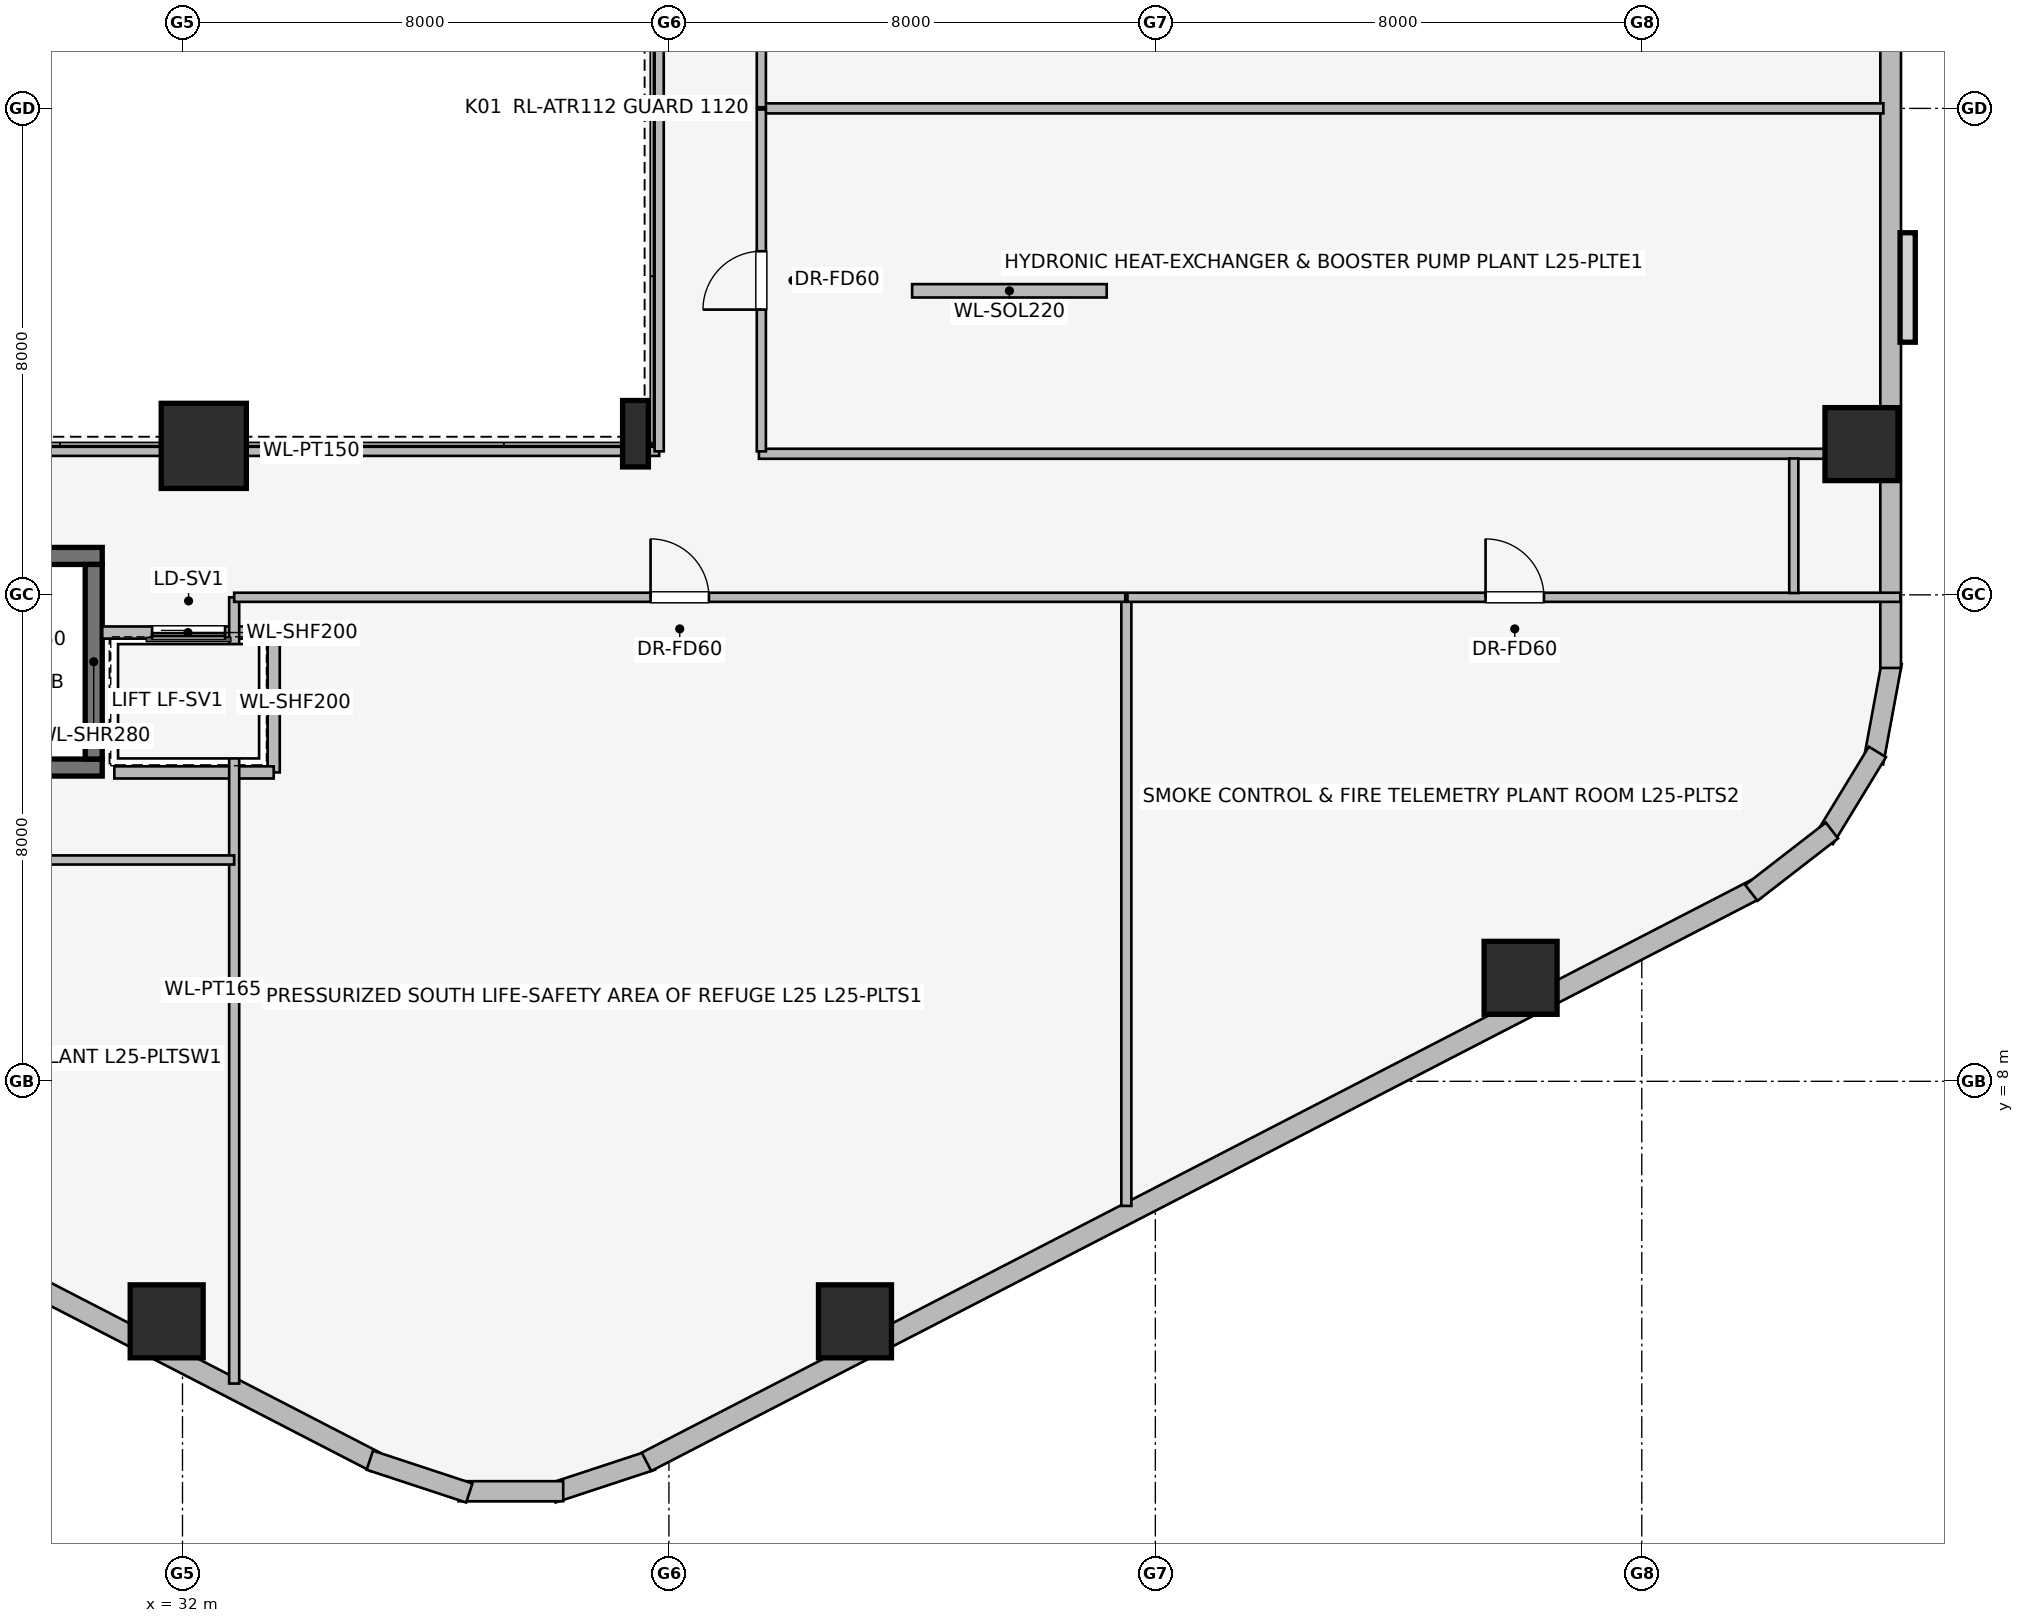
"""IFC4 building model, lengths in metres.
Left out: names, types, materials, properties, quantities, classifications, styles, units other than length and angle.
Written with IfcOpenShell. Run it as: python <this file> out.ifc"""

import sys

from ifc_helpers import new_model, si_unit, direction, frame, frame_2d, origin, origin_2d, place, context, subcontext, project, spatial, rectangle, i_section, extrude, element, fill, save


model = new_model("IFC4")
c1 = context("Model", 3, precision=1e-05, world=origin(), true_north=direction((0.0, 1.0)))
c2 = subcontext(c1, "Body", "Model", "MODEL_VIEW")
j1 = project(units=[si_unit("LENGTHUNIT", "METRE"), si_unit("PLANEANGLEUNIT", "RADIAN")], contexts=[c1])
p1 = place(None, origin())
s1 = spatial("IfcSite", under=j1, at=p1, CompositionType="ELEMENT")
p2 = place(p1, origin())
s2 = spatial("IfcBuilding", under=s1, at=p2, CompositionType="ELEMENT")
p3 = place(p2, frame((0.0, 0.0, 96.35)))
s3 = spatial("IfcBuildingStorey", under=s2, at=p3, CompositionType="ELEMENT", Elevation=96.35)
p4 = place(p3, frame((22.32, 13.16, 0.0), z_axis=(0.0, 0.0, 1.0), x_axis=(1.0, 0.0, 0.0)))
e1 = element("IfcWall", 1, at=p4, inside=s3, PredefinedType="SHEAR", context=c2, shape_type="SweptSolid", body=[
    extrude(rectangle(XDim=8.36, YDim=0.28, at=frame_2d((4.18, 0.0))), origin(), (0.0, 0.0, 1.0), 5.2),
])
p5 = place(p3, frame((30.68, 16.64, 0.0), z_axis=(0.0, 0.0, 1.0), x_axis=(-1.0, 0.0, 0.0)))
e2 = element("IfcWall", 2, at=p5, inside=s3, PredefinedType="SHEAR", context=c2, shape_type="SweptSolid", body=[
    extrude(rectangle(XDim=8.36, YDim=0.28, at=frame_2d((4.18, 0.0))), origin(), (0.0, 0.0, 1.0), 5.2),
])
p6 = place(p5, frame((6.08, 0.0, 0.0)))
e3 = element("IfcOpeningElement", 3, at=p6, cuts=e2, PredefinedType="OPENING", context=c2, shape_type="SweptSolid", body=[
    extrude(rectangle(XDim=1.05, YDim=2.0, at=frame_2d((0.525, 1.0))), frame((0.0, 0.15, 0.0), z_axis=(0.0, -1.0, 0.0), x_axis=(1.0, 0.0, 0.0)), (0.0, 0.0, 1.0), 0.3),
])
p7 = place(p3, frame((30.54, 13.3, 0.0), z_axis=(0.0, 0.0, 1.0), x_axis=(0.0, 1.0, 0.0)))
e4 = element("IfcWall", 4, at=p7, inside=s3, PredefinedType="SHEAR", context=c2, shape_type="SweptSolid", body=[
    extrude(rectangle(XDim=3.2, YDim=0.28, at=frame_2d((1.6, 0.0))), origin(), (0.0, 0.0, 1.0), 5.2),
])
p8 = place(p3, frame((32.35, 18.45, 0.0), z_axis=(0.0, 0.0, 1.0), x_axis=(1.0, 0.0, 0.0)))
e5 = element("IfcColumn", 5, at=p8, inside=s3, PredefinedType="COLUMN", context=c2, shape_type="SweptSolid", body=[
    extrude(rectangle(XDim=1.4, YDim=1.4, at=origin_2d()), origin(), (0.0, 0.0, 1.0), 5.2),
])
for number, where, z_axis, x_axis in (
    (6, (31.74, 4.053, 0.0), (0.0, 0.0, 1.0), (1.0, 0.0, 0.0)),
    (7, (43.06, 4.053, 0.0), (0.0, 0.0, 1.0), (1.0, 0.0, 0.0)),
    (8, (54.007, 9.702, 0.0), (0.0, 0.0, 1.0), (1.0, 0.0, 0.0)),
    (9, (59.613, 18.479, 0.0), (0.0, 0.0, 1.0), (1.0, 0.0, 0.0)),
):
    element("IfcColumn", number, at=place(p3, frame(where, z_axis=z_axis, x_axis=x_axis)), inside=s3, PredefinedType="COLUMN", context=c2, shape_type="SweptSolid", body=[
        extrude(rectangle(XDim=1.2, YDim=1.2, at=origin_2d()), origin(), (0.0, 0.0, 1.0), 5.2),
    ])
p9 = place(p3, frame((39.45, 18.65, 0.0), z_axis=(0.0, 0.0, 1.0), x_axis=(1.0, 0.0, 0.0)))
e10 = element("IfcColumn", 10, at=p9, inside=s3, PredefinedType="COLUMN", context=c2, shape_type="SweptSolid", body=[
    extrude(i_section(OverallWidth=0.424, OverallDepth=1.092, WebThickness=0.045, FlangeThickness=0.082, at=origin_2d()), origin(), (0.0, 0.0, 1.0), 5.2),
])
p10 = place(p3, frame((35.169, 1.743, 0.0), z_axis=(0.0, 0.0, 1.0), x_axis=(-0.888634413993, 0.458616264721, 0.0)))
e11 = element("IfcWall", 11, at=p10, inside=s3, PredefinedType="STANDARD", context=c2, shape_type="SweptSolid", body=[
    extrude(rectangle(XDim=20.531, YDim=0.34, at=frame_2d((10.266, 0.0))), origin(), (0.0, 0.0, 1.0), 3.688),
])
p11 = place(p3, frame((39.719, 1.769, 0.0), z_axis=(0.0, 0.0, 1.0), x_axis=(-0.94976901097, -0.312951794691, 0.0)))
e12 = element("IfcWall", 12, at=p11, inside=s3, PredefinedType="STANDARD", context=c2, shape_type="SweptSolid", body=[
    extrude(rectangle(XDim=1.722, YDim=0.33, at=frame_2d((0.861, 0.0))), origin(), (0.0, 0.0, 1.0), 4.78),
])
p12 = place(p3, frame((38.261, 1.259, 0.0), z_axis=(0.0, 0.0, 1.0), x_axis=(-1.0, 0.0, 0.0)))
e13 = element("IfcWall", 13, at=p12, inside=s3, PredefinedType="STANDARD", context=c2, shape_type="SweptSolid", body=[
    extrude(rectangle(XDim=1.722, YDim=0.33, at=frame_2d((0.861, 0.0))), origin(), (0.0, 0.0, 1.0), 4.78),
])
p13 = place(p3, frame((36.717, 1.23, 0.0), z_axis=(0.0, 0.0, 1.0), x_axis=(-0.94976901097, 0.312951794691, 0.0)))
e14 = element("IfcWall", 14, at=p13, inside=s3, PredefinedType="STANDARD", context=c2, shape_type="SweptSolid", body=[
    extrude(rectangle(XDim=1.722, YDim=0.33, at=frame_2d((0.861, 0.0))), origin(), (0.0, 0.0, 1.0), 4.78),
])
p14 = place(p3, frame((57.876, 11.159, 0.0), z_axis=(0.0, 0.0, 1.0), x_axis=(-0.888634413993, -0.458616264721, 0.0)))
e15 = element("IfcWall", 15, at=p14, inside=s3, PredefinedType="STANDARD", context=c2, shape_type="SweptSolid", body=[
    extrude(rectangle(XDim=20.531, YDim=0.34, at=frame_2d((10.266, 0.0))), origin(), (0.0, 0.0, 1.0), 3.42),
])
p15 = place(p3, frame((60.113, 14.892, 0.0), z_axis=(0.0, 0.0, 1.0), x_axis=(-0.181714143354, -0.983351397063, 0.0)))
e16 = element("IfcWall", 16, at=p15, inside=s3, PredefinedType="STANDARD", context=c2, shape_type="SweptSolid", body=[
    extrude(rectangle(XDim=1.678, YDim=0.33, at=frame_2d((0.839, 0.0))), origin(), (0.0, 0.0, 1.0), 4.78),
])
p16 = place(p3, frame((59.875, 13.417, 0.0), z_axis=(0.0, 0.0, 1.0), x_axis=(-0.520584129191, -0.853810379671, 0.0)))
e17 = element("IfcWall", 17, at=p16, inside=s3, PredefinedType="STANDARD", context=c2, shape_type="SweptSolid", body=[
    extrude(rectangle(XDim=1.677, YDim=0.33, at=frame_2d((0.838, 0.0))), origin(), (0.0, 0.0, 1.0), 4.78),
])
p17 = place(p3, frame((59.127, 12.125, 0.0), z_axis=(0.0, 0.0, 1.0), x_axis=(-0.790691856293, -0.61221433207, 0.0)))
e18 = element("IfcWall", 18, at=p17, inside=s3, PredefinedType="STANDARD", context=c2, shape_type="SweptSolid", body=[
    extrude(rectangle(XDim=1.676, YDim=0.33, at=frame_2d((0.838, 0.0))), origin(), (0.0, 0.0, 1.0), 4.78),
])
p18 = place(p3, frame((60.093, 33.202, 0.0), z_axis=(0.0, 0.0, 1.0), x_axis=(0.0, -1.0, 0.0)))
e19 = element("IfcWall", 19, at=p18, inside=s3, PredefinedType="STANDARD", context=c2, shape_type="SweptSolid", body=[
    extrude(rectangle(XDim=18.404, YDim=0.34, at=frame_2d((9.202, 0.0))), origin(), (0.0, 0.0, 1.0), 3.688),
])
p19 = place(p3, frame((44.0, 21.0, 0.0), z_axis=(0.0, 0.0, 1.0), x_axis=(1.0, 0.0, 0.0)))
e20 = element("IfcWall", 20, at=p19, inside=s3, PredefinedType="SOLIDWALL", context=c2, shape_type="SweptSolid", body=[
    extrude(rectangle(XDim=3.2, YDim=0.22, at=frame_2d((1.6, 0.0))), origin(), (0.0, 0.0, 1.0), 2.8),
])
p20 = place(p3, frame((33.5, 15.38, 0.0), z_axis=(0.0, 0.0, 1.0), x_axis=(-1.0, 0.0, 0.0)))
e21 = element("IfcWall", 21, at=p20, inside=s3, PredefinedType="PARTITIONING", context=c2, shape_type="SweptSolid", body=[
    extrude(rectangle(XDim=2.82, YDim=0.2, at=frame_2d((1.41, 0.0))), origin(), (0.0, 0.0, 1.0), 4.78),
])
p21 = place(p20, frame((0.8, 0.0, 0.0)))
e22 = element("IfcOpeningElement", 22, at=p21, cuts=e21, PredefinedType="OPENING", context=c2, shape_type="SweptSolid", body=[
    extrude(rectangle(XDim=1.2, YDim=2.2, at=frame_2d((0.6, 1.1))), frame((0.0, 0.11, 0.0), z_axis=(0.0, -1.0, 0.0), x_axis=(1.0, 0.0, 0.0)), (0.0, 0.0, 1.0), 0.22),
])
p22 = place(p3, frame((33.5, 13.08, 0.0), z_axis=(0.0, 0.0, 1.0), x_axis=(0.0, 1.0, 0.0)))
e23 = element("IfcWall", 23, at=p22, inside=s3, PredefinedType="PARTITIONING", context=c2, shape_type="SweptSolid", body=[
    extrude(rectangle(XDim=2.3, YDim=0.2, at=frame_2d((1.15, 0.0))), origin(), (0.0, 0.0, 1.0), 4.78),
])
p23 = place(p3, frame((30.879, 13.08, 0.0), z_axis=(0.0, 0.0, 1.0), x_axis=(1.0, 0.0, 0.0)))
e24 = element("IfcWall", 24, at=p23, inside=s3, PredefinedType="PARTITIONING", context=c2, shape_type="SweptSolid", body=[
    extrude(rectangle(XDim=2.621, YDim=0.2, at=frame_2d((1.311, 0.0))), origin(), (0.0, 0.0, 1.0), 4.78),
])
p24 = place(p3, frame((27.7, 18.36, 0.0), z_axis=(0.0, 0.0, 1.0), x_axis=(1.0, 0.0, 0.0)))
e25 = element("IfcWall", 25, at=p24, inside=s3, PredefinedType="PARTITIONING", context=c2, shape_type="SweptSolid", body=[
    extrude(rectangle(XDim=12.14, YDim=0.15, at=frame_2d((6.07, 0.0))), origin(), (0.0, 0.0, 1.0), 3.921),
])
p25 = place(p3, frame((39.84, 18.36, 0.0), z_axis=(0.0, 0.0, 1.0), x_axis=(0.0, 1.0, 0.0)))
e26 = element("IfcWall", 26, at=p25, inside=s3, PredefinedType="PARTITIONING", context=c2, shape_type="SweptSolid", body=[
    extrude(rectangle(XDim=11.28, YDim=0.15, at=frame_2d((5.64, 0.0))), origin(), (0.0, 0.0, 1.0), 3.688),
])
p26 = place(p3, frame((32.85, 3.03, 0.0), z_axis=(0.0, 0.0, 1.0), x_axis=(0.0, 1.0, 0.0)))
e27 = element("IfcWall", 27, at=p26, inside=s3, PredefinedType="PARTITIONING", context=c2, shape_type="SweptSolid", body=[
    extrude(rectangle(XDim=12.93, YDim=0.165, at=frame_2d((6.465, 0.0))), origin(), (0.0, 0.0, 1.0), 4.78),
])
p27 = place(p3, frame((32.85, 11.64, 0.0), z_axis=(0.0, 0.0, 1.0), x_axis=(-1.0, 0.0, 0.0)))
e28 = element("IfcWall", 28, at=p27, inside=s3, PredefinedType="PARTITIONING", context=c2, shape_type="SweptSolid", body=[
    extrude(rectangle(XDim=16.596, YDim=0.15, at=frame_2d((8.298, 0.0))), origin(), (0.0, 0.0, 1.0), 4.78),
])
p28 = place(p27, frame((7.818, 0.0, 0.0)))
e29 = element("IfcOpeningElement", 29, at=p28, cuts=e28, PredefinedType="OPENING", context=c2, shape_type="SweptSolid", body=[
    extrude(rectangle(XDim=0.96, YDim=2.0, at=frame_2d((0.48, 1.0))), frame((0.0, 0.085, 0.0), z_axis=(0.0, -1.0, 0.0), x_axis=(1.0, 0.0, 0.0)), (0.0, 0.0, 1.0), 0.17),
])
p29 = place(p3, frame((41.48, 18.32, 0.0), z_axis=(0.0, 0.0, 1.0), x_axis=(1.0, 0.0, 0.0)))
e30 = element("IfcWall", 30, at=p29, inside=s3, PredefinedType="PARTITIONING", context=c2, shape_type="SweptSolid", body=[
    extrude(rectangle(XDim=18.533, YDim=0.165, at=frame_2d((9.267, 0.0))), origin(), (0.0, 0.0, 1.0), 4.78),
])
p30 = place(p3, frame((41.55, 24.0, 0.0), z_axis=(0.0, 0.0, 1.0), x_axis=(1.0, 0.0, 0.0)))
e31 = element("IfcWall", 31, at=p30, inside=s3, PredefinedType="PARTITIONING", context=c2, shape_type="SweptSolid", body=[
    extrude(rectangle(XDim=18.423, YDim=0.165, at=frame_2d((9.211, 0.0))), origin(), (0.0, 0.0, 1.0), 4.78),
])
p31 = place(p3, frame((41.52, 18.36, 0.0), z_axis=(0.0, 0.0, 1.0), x_axis=(0.0, 1.0, 0.0)))
e32 = element("IfcWall", 32, at=p31, inside=s3, PredefinedType="PARTITIONING", context=c2, shape_type="SweptSolid", body=[
    extrude(rectangle(XDim=5.622, YDim=0.15, at=frame_2d((2.811, 0.0))), origin(), (0.0, 0.0, 1.0), 4.78),
])
p32 = place(p31, frame((2.331, 0.0, 0.0)))
e33 = element("IfcOpeningElement", 33, at=p32, cuts=e32, PredefinedType="OPENING", context=c2, shape_type="SweptSolid", body=[
    extrude(rectangle(XDim=0.96, YDim=2.0, at=frame_2d((0.48, 1.0))), frame((0.0, 0.085, 0.0), z_axis=(0.0, -1.0, 0.0), x_axis=(1.0, 0.0, 0.0)), (0.0, 0.0, 1.0), 0.17),
])
p33 = place(p3, frame((41.52, 24.018, 0.0), z_axis=(0.0, 0.0, 1.0), x_axis=(0.0, 1.0, 0.0)))
e34 = element("IfcWall", 34, at=p33, inside=s3, PredefinedType="PARTITIONING", context=c2, shape_type="SweptSolid", body=[
    extrude(rectangle(XDim=5.622, YDim=0.15, at=frame_2d((2.811, 0.0))), origin(), (0.0, 0.0, 1.0), 4.78),
])
p34 = place(p33, frame((2.331, 0.0, 0.0)))
e35 = element("IfcOpeningElement", 35, at=p34, cuts=e34, PredefinedType="OPENING", context=c2, shape_type="SweptSolid", body=[
    extrude(rectangle(XDim=0.96, YDim=2.0, at=frame_2d((0.48, 1.0))), frame((0.0, 0.085, 0.0), z_axis=(0.0, -1.0, 0.0), x_axis=(1.0, 0.0, 0.0)), (0.0, 0.0, 1.0), 0.17),
])
p35 = place(p3, frame((47.523, 5.951, 0.0), z_axis=(0.0, 0.0, 1.0), x_axis=(0.0, 1.0, 0.0)))
e36 = element("IfcWall", 36, at=p35, inside=s3, PredefinedType="PARTITIONING", context=c2, shape_type="SweptSolid", body=[
    extrude(rectangle(XDim=9.979, YDim=0.165, at=frame_2d((4.99, 0.0))), origin(), (0.0, 0.0, 1.0), 4.78),
])
p36 = place(p3, frame((32.85, 15.96, 0.0), z_axis=(0.0, 0.0, 1.0), x_axis=(1.0, 0.0, 0.0)))
e37 = element("IfcWall", 37, at=p36, inside=s3, PredefinedType="PARTITIONING", context=c2, shape_type="SweptSolid", body=[
    extrude(rectangle(XDim=14.655, YDim=0.15, at=frame_2d((7.327, 0.0))), origin(), (0.0, 0.0, 1.0), 4.78),
])
p37 = place(p36, frame((6.848, 0.0, 0.0)))
e38 = element("IfcOpeningElement", 38, at=p37, cuts=e37, PredefinedType="OPENING", context=c2, shape_type="SweptSolid", body=[
    extrude(rectangle(XDim=0.96, YDim=2.0, at=frame_2d((0.48, 1.0))), frame((0.0, 0.085, 0.0), z_axis=(0.0, -1.0, 0.0), x_axis=(1.0, 0.0, 0.0)), (0.0, 0.0, 1.0), 0.17),
])
p38 = place(p3, frame((47.541, 15.96, 0.0), z_axis=(0.0, 0.0, 1.0), x_axis=(1.0, 0.0, 0.0)))
e39 = element("IfcWall", 39, at=p38, inside=s3, PredefinedType="PARTITIONING", context=c2, shape_type="SweptSolid", body=[
    extrude(rectangle(XDim=12.712, YDim=0.15, at=frame_2d((6.356, 0.0))), origin(), (0.0, 0.0, 1.0), 4.78),
])
p39 = place(p38, frame((5.89, 0.0, 0.0)))
e40 = element("IfcOpeningElement", 40, at=p39, cuts=e39, PredefinedType="OPENING", context=c2, shape_type="SweptSolid", body=[
    extrude(rectangle(XDim=0.96, YDim=2.0, at=frame_2d((0.48, 1.0))), frame((0.0, 0.085, 0.0), z_axis=(0.0, -1.0, 0.0), x_axis=(1.0, 0.0, 0.0)), (0.0, 0.0, 1.0), 0.17),
])
p40 = place(p3, frame((58.5, 18.242, 0.0), z_axis=(0.0, 0.0, 1.0), x_axis=(0.0, -1.0, 0.0)))
e41 = element("IfcWall", 41, at=p40, inside=s3, PredefinedType="PARTITIONING", context=c2, shape_type="SweptSolid", body=[
    extrude(rectangle(XDim=2.212, YDim=0.15, at=frame_2d((1.106, 0.0))), origin(), (0.0, 0.0, 1.0), 4.78),
])
p41 = place(p21, origin())
e42 = element("IfcDoor", 42, at=p41, inside=s3, OperationType="SLIDING_TO_RIGHT", PredefinedType="DOOR", context=c2, shape_type="SweptSolid", body=[
    extrude(rectangle(XDim=1.2, YDim=2.2, at=frame_2d((0.6, 1.1))), frame((0.0, 0.025, 0.0), z_axis=(0.0, -1.0, 0.0), x_axis=(1.0, 0.0, 0.0)), (0.0, 0.0, 1.0), 0.05),
])
fill(e22, e42)
p42 = place(p32, origin())
e43 = element("IfcDoor", 43, at=p42, inside=s3, OperationType="SINGLE_SWING_LEFT", PredefinedType="DOOR", context=c2, shape_type="SweptSolid", body=[
    extrude(rectangle(XDim=0.96, YDim=2.0, at=frame_2d((0.48, 1.0))), frame((0.0, 0.025, 0.0), z_axis=(0.0, -1.0, 0.0), x_axis=(1.0, 0.0, 0.0)), (0.0, 0.0, 1.0), 0.05),
])
fill(e33, e43)
p43 = place(p37, origin())
e44 = element("IfcDoor", 44, at=p43, inside=s3, OperationType="SINGLE_SWING_LEFT", PredefinedType="DOOR", context=c2, shape_type="SweptSolid", body=[
    extrude(rectangle(XDim=0.96, YDim=2.0, at=frame_2d((0.48, 1.0))), frame((0.0, 0.025, 0.0), z_axis=(0.0, -1.0, 0.0), x_axis=(1.0, 0.0, 0.0)), (0.0, 0.0, 1.0), 0.05),
])
fill(e38, e44)
p44 = place(p39, origin())
e45 = element("IfcDoor", 45, at=p44, inside=s3, OperationType="SINGLE_SWING_LEFT", PredefinedType="DOOR", context=c2, shape_type="SweptSolid", body=[
    extrude(rectangle(XDim=0.96, YDim=2.0, at=frame_2d((0.48, 1.0))), frame((0.0, 0.025, 0.0), z_axis=(0.0, -1.0, 0.0), x_axis=(1.0, 0.0, 0.0)), (0.0, 0.0, 1.0), 0.05),
])
fill(e40, e45)
save(model, sys.argv[1])
